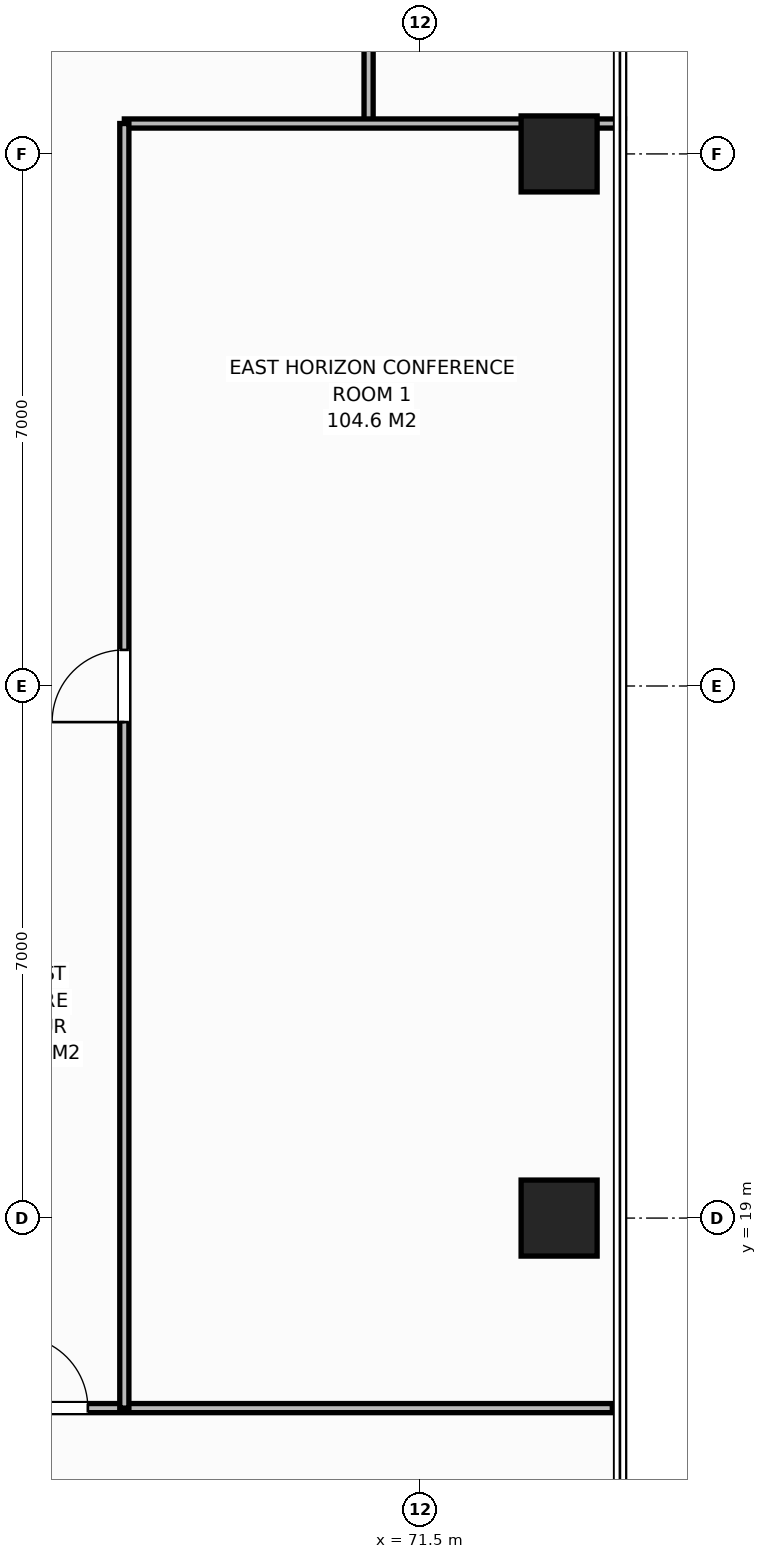
"""IFC4 building model, lengths in metres.
Left out: names, types, materials, properties, quantities, classifications, styles, units other than length and angle.
Written with IfcOpenShell. Run it as: python <this file> out.ifc"""

import sys

from ifc_helpers import new_model, si_unit, direction, frame, frame_2d, origin, origin_2d, place, context, subcontext, project, spatial, rectangle, extrude, element, fill, save


model = new_model("IFC4")
c1 = context("Model", 3, precision=1e-05, world=origin(), true_north=direction((0.0, 1.0)))
c2 = subcontext(c1, "Body", "Model", "MODEL_VIEW")
j1 = project(units=[si_unit("LENGTHUNIT", "METRE"), si_unit("PLANEANGLEUNIT", "RADIAN")], contexts=[c1])
p1 = place(None, origin())
s1 = spatial("IfcSite", under=j1, at=p1, CompositionType="ELEMENT")
p2 = place(p1, origin())
s2 = spatial("IfcBuilding", under=s1, at=p2, CompositionType="ELEMENT")
p3 = place(p2, frame((0.0, 0.0, 186.0)))
s3 = spatial("IfcBuildingStorey", under=s2, at=p3, CompositionType="ELEMENT", Elevation=186.0)
for number, where, z_axis, x_axis in (
    (1, (73.32, 19.0, 0.0), (0.0, 0.0, 1.0), (1.0, 0.0, 0.0)),
    (2, (73.32, 33.0, 0.0), (0.0, 0.0, 1.0), (1.0, 0.0, 0.0)),
):
    element("IfcColumn", number, at=place(p3, frame(where, z_axis=z_axis, x_axis=x_axis)), inside=s3, PredefinedType="COLUMN", context=c2, shape_type="SweptSolid", body=[
        extrude(rectangle(XDim=1.0, YDim=1.0, at=origin_2d()), origin(), (0.0, 0.0, 1.0), 3.8),
    ])
p4 = place(p3, frame((70.813, 33.4, 0.0), z_axis=(0.0, 0.0, 1.0), x_axis=(0.0, 1.0, 0.0)))
e3 = element("IfcWall", 3, at=p4, inside=s3, PredefinedType="PARTITIONING", context=c2, shape_type="SweptSolid", body=[
    extrude(rectangle(XDim=2.1, YDim=0.12, at=frame_2d((1.05, 0.0))), origin(), (0.0, 0.0, 1.0), 3.572),
])
p5 = place(p3, frame((62.93, 16.5, 0.0), z_axis=(0.0, 0.0, 1.0), x_axis=(1.0, 0.0, 0.0)))
e4 = element("IfcWall", 4, at=p5, inside=s3, PredefinedType="PARTITIONING", context=c2, shape_type="SweptSolid", body=[
    extrude(rectangle(XDim=11.09, YDim=0.12, at=frame_2d((5.545, 0.0))), origin(), (0.0, 0.0, 1.0), 3.572),
])
p6 = place(p5, frame((3.24, 0.0, 0.0)))
e5 = element("IfcOpeningElement", 5, at=p6, cuts=e4, PredefinedType="OPENING", context=c2, shape_type="SweptSolid", body=[
    extrude(rectangle(XDim=0.95, YDim=2.15, at=frame_2d((0.475, 1.075))), frame((0.0, 0.07, 0.0), z_axis=(0.0, -1.0, 0.0), x_axis=(1.0, 0.0, 0.0)), (0.0, 0.0, 1.0), 0.14),
])
p7 = place(p3, frame((67.6, 33.4, 0.0), z_axis=(0.0, 0.0, 1.0), x_axis=(1.0, 0.0, 0.0)))
e6 = element("IfcWall", 6, at=p7, inside=s3, PredefinedType="PARTITIONING", context=c2, shape_type="SweptSolid", body=[
    extrude(rectangle(XDim=6.58, YDim=0.12, at=frame_2d((3.29, 0.0))), origin(), (0.0, 0.0, 1.0), 3.572),
])
p8 = place(p3, frame((67.6, 16.5, 0.0), z_axis=(0.0, 0.0, 1.0), x_axis=(0.0, 1.0, 0.0)))
e7 = element("IfcWall", 7, at=p8, inside=s3, PredefinedType="PARTITIONING", context=c2, shape_type="SweptSolid", body=[
    extrude(rectangle(XDim=16.9, YDim=0.12, at=frame_2d((8.45, 0.0))), origin(), (0.0, 0.0, 1.0), 3.572),
])
p9 = place(p8, frame((9.025, 0.0, 0.0)))
e8 = element("IfcOpeningElement", 8, at=p9, cuts=e7, PredefinedType="OPENING", context=c2, shape_type="SweptSolid", body=[
    extrude(rectangle(XDim=0.95, YDim=2.15, at=frame_2d((0.475, 1.075))), frame((0.0, 0.07, 0.0), z_axis=(0.0, -1.0, 0.0), x_axis=(1.0, 0.0, 0.0)), (0.0, 0.0, 1.0), 0.14),
])
p10 = place(p6, origin())
e9 = element("IfcDoor", 9, at=p10, inside=s3, OperationType="SINGLE_SWING_LEFT", PredefinedType="DOOR", context=c2, shape_type="SweptSolid", body=[
    extrude(rectangle(XDim=0.95, YDim=2.15, at=frame_2d((0.475, 1.075))), frame((0.0, 0.025, 0.0), z_axis=(0.0, -1.0, 0.0), x_axis=(1.0, 0.0, 0.0)), (0.0, 0.0, 1.0), 0.05),
])
fill(e5, e9)
p11 = place(p9, origin())
e10 = element("IfcDoor", 10, at=p11, inside=s3, OperationType="SINGLE_SWING_LEFT", PredefinedType="DOOR", context=c2, shape_type="SweptSolid", body=[
    extrude(rectangle(XDim=0.95, YDim=2.15, at=frame_2d((0.475, 1.075))), frame((0.0, 0.025, 0.0), z_axis=(0.0, -1.0, 0.0), x_axis=(1.0, 0.0, 0.0)), (0.0, 0.0, 1.0), 0.05),
])
fill(e8, e10)
save(model, sys.argv[1])
